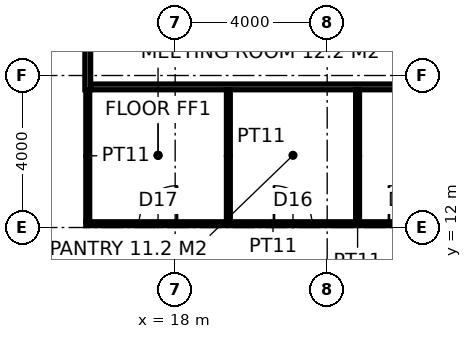
"""IFC4 building model, lengths in metres.
Left out: names, types, materials, properties, quantities, classifications, styles, units other than length and angle.
Written with IfcOpenShell. Run it as: python <this file> out.ifc"""

import sys

from ifc_helpers import new_model, si_unit, direction, frame, frame_2d, origin, place, context, subcontext, project, spatial, rectangle, extrude, element, fill, save


model = new_model("IFC4")
c1 = context("Model", 3, precision=1e-05, world=origin(), true_north=direction((0.0, 1.0)))
c2 = subcontext(c1, "Body", "Model", "MODEL_VIEW")
j1 = project(units=[si_unit("LENGTHUNIT", "METRE"), si_unit("PLANEANGLEUNIT", "RADIAN")], contexts=[c1])
p1 = place(None, origin())
s1 = spatial("IfcSite", under=j1, at=p1, CompositionType="ELEMENT")
p2 = place(p1, origin())
s2 = spatial("IfcBuilding", under=s1, at=p2, CompositionType="ELEMENT")
p3 = place(p2, frame((0.0, 0.0, 234.2)))
s3 = spatial("IfcBuildingStorey", under=s2, at=p3, CompositionType="ELEMENT", Elevation=234.2)
p4 = place(p3, frame((15.7, 15.625, 0.0), z_axis=(0.0, 0.0, 1.0), x_axis=(0.0, 1.0, 0.0)))
e1 = element("IfcWall", 1, at=p4, inside=s3, PredefinedType="PARTITIONING", context=c2, shape_type="SweptSolid", body=[
    extrude(rectangle(XDim=22.75, YDim=0.15, at=frame_2d((11.375, 0.0))), origin(), (0.0, 0.0, 1.0), 3.85),
])
p5 = place(p4, frame((10.475, 0.0, 0.0)))
e2 = element("IfcOpeningElement", 2, at=p5, cuts=e1, PredefinedType="OPENING", context=c2, shape_type="SweptSolid", body=[
    extrude(rectangle(XDim=1.8, YDim=2.4, at=frame_2d((0.9, 1.2))), frame((0.0, 0.085, 0.0), z_axis=(0.0, -1.0, 0.0), x_axis=(1.0, 0.0, 0.0)), (0.0, 0.0, 1.0), 0.17),
])
p6 = place(p3, frame((15.775, 15.7, 0.0), z_axis=(0.0, 0.0, 1.0), x_axis=(1.0, 0.0, 0.0)))
e3 = element("IfcWall", 3, at=p6, inside=s3, PredefinedType="PARTITIONING", context=c2, shape_type="SweptSolid", body=[
    extrude(rectangle(XDim=22.65, YDim=0.15, at=frame_2d((11.325, 0.0))), origin(), (0.0, 0.0, 1.0), 3.85),
])
p7 = place(p3, frame((15.65, 12.1, 0.0), z_axis=(0.0, 0.0, 1.0), x_axis=(1.0, 0.0, 0.0)))
e4 = element("IfcWall", 4, at=p7, inside=s3, PredefinedType="PARTITIONING", context=c2, shape_type="SweptSolid", body=[
    extrude(rectangle(XDim=9.85, YDim=0.1, at=frame_2d((4.925, 0.0))), origin(), (0.0, 0.0, 1.0), 3.85),
])
p8 = place(p7, frame((1.4, 0.0, 0.0)))
e5 = element("IfcOpeningElement", 5, at=p8, cuts=e4, PredefinedType="OPENING", context=c2, shape_type="SweptSolid", body=[
    extrude(rectangle(XDim=1.0, YDim=2.2, at=frame_2d((0.5, 1.1))), frame((0.0, 0.06, 0.0), z_axis=(0.0, -1.0, 0.0), x_axis=(1.0, 0.0, 0.0)), (0.0, 0.0, 1.0), 0.12),
])
p9 = place(p7, frame((4.95, 0.0, 0.0)))
e6 = element("IfcOpeningElement", 6, at=p9, cuts=e4, PredefinedType="OPENING", context=c2, shape_type="SweptSolid", body=[
    extrude(rectangle(XDim=1.0, YDim=2.2, at=frame_2d((0.5, 1.1))), frame((0.0, 0.06, 0.0), z_axis=(0.0, -1.0, 0.0), x_axis=(1.0, 0.0, 0.0)), (0.0, 0.0, 1.0), 0.12),
])
p10 = place(p7, frame((7.975, 0.0, 0.0)))
e7 = element("IfcOpeningElement", 7, at=p10, cuts=e4, PredefinedType="OPENING", context=c2, shape_type="SweptSolid", body=[
    extrude(rectangle(XDim=1.0, YDim=2.2, at=frame_2d((0.5, 1.1))), frame((0.0, 0.06, 0.0), z_axis=(0.0, -1.0, 0.0), x_axis=(1.0, 0.0, 0.0)), (0.0, 0.0, 1.0), 0.12),
])
for number, where, z_axis, x_axis in (
    (8, (15.7, 12.15, 0.0), (0.0, 0.0, 1.0), (0.0, 1.0, 0.0)),
    (9, (19.4, 12.15, 0.0), (0.0, 0.0, 1.0), (0.0, 1.0, 0.0)),
    (10, (22.8, 12.15, 0.0), (0.0, 0.0, 1.0), (0.0, 1.0, 0.0)),
):
    element("IfcWall", number, at=place(p3, frame(where, z_axis=z_axis, x_axis=x_axis)), inside=s3, PredefinedType="PARTITIONING", context=c2, shape_type="SweptSolid", body=[
        extrude(rectangle(XDim=3.475, YDim=0.1, at=frame_2d((1.738, 0.0))), origin(), (0.0, 0.0, 1.0), 3.85),
    ])
p11 = place(p8, origin())
e11 = element("IfcDoor", 11, at=p11, inside=s3, OperationType="SINGLE_SWING_RIGHT", PredefinedType="DOOR", context=c2, shape_type="SweptSolid", body=[
    extrude(rectangle(XDim=1.0, YDim=2.2, at=frame_2d((0.5, 1.1))), frame((0.0, 0.025, 0.0), z_axis=(0.0, -1.0, 0.0), x_axis=(1.0, 0.0, 0.0)), (0.0, 0.0, 1.0), 0.05),
])
fill(e5, e11)
p12 = place(p9, origin())
e12 = element("IfcDoor", 12, at=p12, inside=s3, OperationType="SINGLE_SWING_LEFT", PredefinedType="DOOR", context=c2, shape_type="SweptSolid", body=[
    extrude(rectangle(XDim=1.0, YDim=2.2, at=frame_2d((0.5, 1.1))), frame((0.0, 0.025, 0.0), z_axis=(0.0, -1.0, 0.0), x_axis=(1.0, 0.0, 0.0)), (0.0, 0.0, 1.0), 0.05),
])
fill(e6, e12)
p13 = place(p10, origin())
e13 = element("IfcDoor", 13, at=p13, inside=s3, OperationType="SINGLE_SWING_LEFT", PredefinedType="DOOR", context=c2, shape_type="SweptSolid", body=[
    extrude(rectangle(XDim=1.0, YDim=2.2, at=frame_2d((0.5, 1.1))), frame((0.0, 0.025, 0.0), z_axis=(0.0, -1.0, 0.0), x_axis=(1.0, 0.0, 0.0)), (0.0, 0.0, 1.0), 0.05),
])
fill(e7, e13)
save(model, sys.argv[1])
